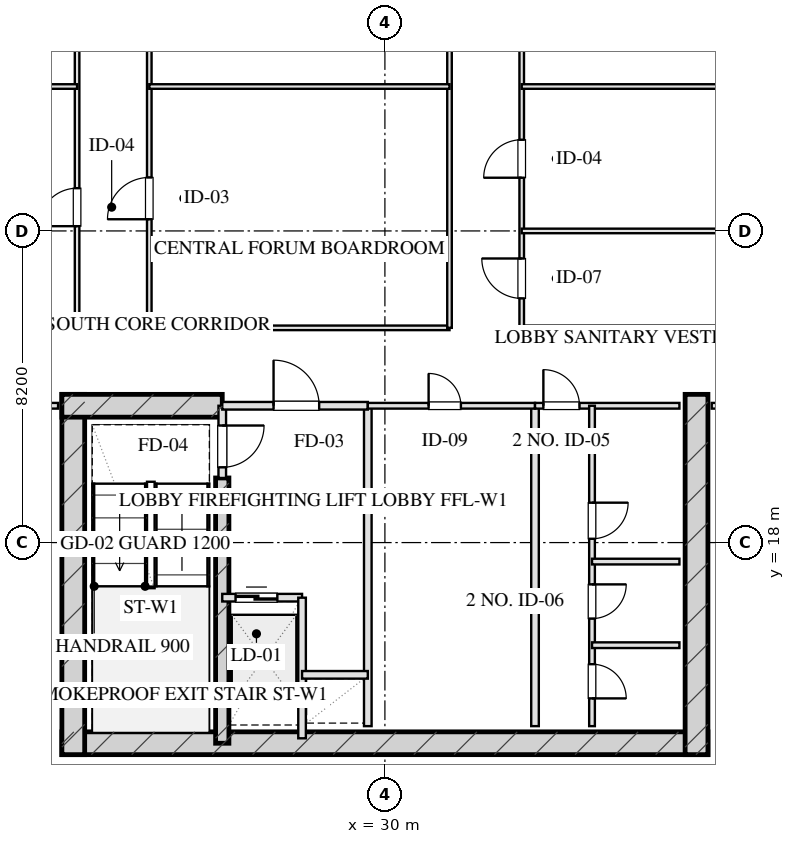
"""IFC4 building model, lengths in metres.
Left out: names, types, materials, properties, quantities, classifications, styles, units other than length and angle.
Written with IfcOpenShell. Run it as: python <this file> out.ifc"""

import sys

from ifc_helpers import new_model, si_unit, direction, frame, frame_2d, origin, place, context, subcontext, project, spatial, rectangle, extrude, element, fill, save


model = new_model("IFC4")
c1 = context("Model", 3, precision=1e-05, world=origin(), true_north=direction((0.0, 1.0)))
c2 = subcontext(c1, "Body", "Model", "MODEL_VIEW")
j1 = project(units=[si_unit("LENGTHUNIT", "METRE"), si_unit("PLANEANGLEUNIT", "RADIAN")], contexts=[c1])
p1 = place(None, origin())
s1 = spatial("IfcSite", under=j1, at=p1, CompositionType="ELEMENT")
p2 = place(p1, origin())
s2 = spatial("IfcBuilding", under=s1, at=p2, CompositionType="ELEMENT")
p3 = place(p2, frame((0.0, 0.0, 120.75)))
s3 = spatial("IfcBuildingStorey", under=s2, at=p3, CompositionType="ELEMENT", Elevation=120.75)
p4 = place(p3, frame((21.5, 12.72, 0.0), z_axis=(0.0, 0.0, 1.0), x_axis=(1.0, 0.0, 0.0)))
e1 = element("IfcWall", 1, at=p4, inside=s3, PredefinedType="SHEAR", context=c2, shape_type="SweptSolid", body=[
    extrude(rectangle(XDim=17.0, YDim=0.6, at=frame_2d((8.5, 0.0))), origin(), (0.0, 0.0, 1.0), 3.45),
])
for number, where, z_axis, x_axis in (
    (2, (21.8, 21.9, 0.0), (0.0, 0.0, 1.0), (0.0, -1.0, 0.0)),
    (3, (38.2, 21.9, 0.0), (0.0, 0.0, 1.0), (0.0, -1.0, 0.0)),
):
    element("IfcWall", number, at=place(p3, frame(where, z_axis=z_axis, x_axis=x_axis)), inside=s3, PredefinedType="SHEAR", context=c2, shape_type="SweptSolid", body=[
        extrude(rectangle(XDim=9.48, YDim=0.6, at=frame_2d((4.74, 0.0))), origin(), (0.0, 0.0, 1.0), 3.45),
    ])
p5 = place(p3, frame((25.72, 19.7, 0.0), z_axis=(0.0, 0.0, 1.0), x_axis=(0.0, -1.0, 0.0)))
e4 = element("IfcWall", 4, at=p5, inside=s3, PredefinedType="SHEAR", context=c2, shape_type="SweptSolid", body=[
    extrude(rectangle(XDim=6.98, YDim=0.35, at=frame_2d((3.49, 0.0))), origin(), (0.0, 0.0, 1.0), 3.45),
])
p6 = place(p3, frame((21.5, 21.6, 0.0), z_axis=(0.0, 0.0, 1.0), x_axis=(1.0, 0.0, 0.0)))
e5 = element("IfcWall", 5, at=p6, inside=s3, PredefinedType="SHEAR", context=c2, shape_type="SweptSolid", body=[
    extrude(rectangle(XDim=4.22, YDim=0.6, at=frame_2d((2.11, 0.0))), origin(), (0.0, 0.0, 1.0), 3.45),
])
p7 = place(p3, frame((25.72, 21.6, 0.0), z_axis=(0.0, 0.0, 1.0), x_axis=(0.0, -1.0, 0.0)))
e6 = element("IfcWall", 6, at=p7, inside=s3, PredefinedType="PARTITIONING", context=c2, shape_type="SweptSolid", body=[
    extrude(rectangle(XDim=1.9, YDim=0.2, at=frame_2d((0.95, 0.0))), origin(), (0.0, 0.0, 1.0), 3.175),
])
p8 = place(p7, frame((0.52, 0.0, 0.0)))
e7 = element("IfcOpeningElement", 7, at=p8, cuts=e6, PredefinedType="OPENING", context=c2, shape_type="SweptSolid", body=[
    extrude(rectangle(XDim=1.1, YDim=2.05, at=frame_2d((0.55, 1.025))), frame((0.0, 0.11, 0.0), z_axis=(0.0, -1.0, 0.0), x_axis=(1.0, 0.0, 0.0)), (0.0, 0.0, 1.0), 0.22),
])
p9 = place(p3, frame((29.55, 21.6, 0.0), z_axis=(0.0, 0.0, 1.0), x_axis=(0.0, -1.0, 0.0)))
e8 = element("IfcWall", 8, at=p9, inside=s3, PredefinedType="PARTITIONING", context=c2, shape_type="SweptSolid", body=[
    extrude(rectangle(XDim=8.43, YDim=0.2, at=frame_2d((4.215, 0.0))), origin(), (0.0, 0.0, 1.0), 3.175),
])
p10 = place(p3, frame((25.72, 21.6, 0.0), z_axis=(0.0, 0.0, 1.0), x_axis=(1.0, 0.0, 0.0)))
e9 = element("IfcWall", 9, at=p10, inside=s3, PredefinedType="PARTITIONING", context=c2, shape_type="SweptSolid", body=[
    extrude(rectangle(XDim=3.83, YDim=0.2, at=frame_2d((1.915, 0.0))), origin(), (0.0, 0.0, 1.0), 3.175),
])
p11 = place(p10, frame((1.35, 0.0, 0.0)))
e10 = element("IfcOpeningElement", 10, at=p11, cuts=e9, PredefinedType="OPENING", context=c2, shape_type="SweptSolid", body=[
    extrude(rectangle(XDim=1.2, YDim=2.05, at=frame_2d((0.6, 1.025))), frame((0.0, 0.11, 0.0), z_axis=(0.0, -1.0, 0.0), x_axis=(1.0, 0.0, 0.0)), (0.0, 0.0, 1.0), 0.22),
])
p12 = place(p3, frame((25.72, 16.55, 0.0), z_axis=(0.0, 0.0, 1.0), x_axis=(1.0, 0.0, 0.0)))
e11 = element("IfcWall", 11, at=p12, inside=s3, PredefinedType="PARTITIONING", context=c2, shape_type="SweptSolid", body=[
    extrude(rectangle(XDim=2.1, YDim=0.2, at=frame_2d((1.05, 0.0))), origin(), (0.0, 0.0, 1.0), 3.175),
])
p13 = place(p12, frame((0.35, 0.0, 0.0)))
e12 = element("IfcOpeningElement", 12, at=p13, cuts=e11, PredefinedType="OPENING", context=c2, shape_type="SweptSolid", body=[
    extrude(rectangle(XDim=1.1, YDim=2.05, at=frame_2d((0.55, 1.025))), frame((0.0, 0.11, 0.0), z_axis=(0.0, -1.0, 0.0), x_axis=(1.0, 0.0, 0.0)), (0.0, 0.0, 1.0), 0.22),
])
p14 = place(p3, frame((27.82, 16.55, 0.0), z_axis=(0.0, 0.0, 1.0), x_axis=(0.0, -1.0, 0.0)))
e13 = element("IfcWall", 13, at=p14, inside=s3, PredefinedType="PARTITIONING", context=c2, shape_type="SweptSolid", body=[
    extrude(rectangle(XDim=3.7, YDim=0.2, at=frame_2d((1.85, 0.0))), origin(), (0.0, 0.0, 1.0), 3.175),
])
p15 = place(p3, frame((27.82, 14.52, 0.0), z_axis=(0.0, 0.0, 1.0), x_axis=(1.0, 0.0, 0.0)))
e14 = element("IfcWall", 14, at=p15, inside=s3, PredefinedType="PARTITIONING", context=c2, shape_type="SweptSolid", body=[
    extrude(rectangle(XDim=1.73, YDim=0.2, at=frame_2d((0.865, 0.0))), origin(), (0.0, 0.0, 1.0), 3.175),
])
p16 = place(p3, frame((33.95, 21.6, 0.0), z_axis=(0.0, 0.0, 1.0), x_axis=(0.0, -1.0, 0.0)))
e15 = element("IfcWall", 15, at=p16, inside=s3, PredefinedType="PARTITIONING", context=c2, shape_type="SweptSolid", body=[
    extrude(rectangle(XDim=8.43, YDim=0.2, at=frame_2d((4.215, 0.0))), origin(), (0.0, 0.0, 1.0), 3.175),
])
p17 = place(p3, frame((29.55, 21.6, 0.0), z_axis=(0.0, 0.0, 1.0), x_axis=(1.0, 0.0, 0.0)))
e16 = element("IfcWall", 16, at=p17, inside=s3, PredefinedType="PARTITIONING", context=c2, shape_type="SweptSolid", body=[
    extrude(rectangle(XDim=4.4, YDim=0.15, at=frame_2d((2.2, 0.0))), origin(), (0.0, 0.0, 1.0), 3.175),
])
p18 = place(p17, frame((1.6, 0.0, 0.0)))
e17 = element("IfcOpeningElement", 17, at=p18, cuts=e16, PredefinedType="OPENING", context=c2, shape_type="SweptSolid", body=[
    extrude(rectangle(XDim=0.85, YDim=2.05, at=frame_2d((0.425, 1.025))), frame((0.0, 0.085, 0.0), z_axis=(0.0, -1.0, 0.0), x_axis=(1.0, 0.0, 0.0)), (0.0, 0.0, 1.0), 0.17),
])
p19 = place(p3, frame((33.95, 21.6, 0.0), z_axis=(0.0, 0.0, 1.0), x_axis=(1.0, 0.0, 0.0)))
e18 = element("IfcWall", 18, at=p19, inside=s3, PredefinedType="PARTITIONING", context=c2, shape_type="SweptSolid", body=[
    extrude(rectangle(XDim=3.8, YDim=0.15, at=frame_2d((1.9, 0.0))), origin(), (0.0, 0.0, 1.0), 3.175),
])
p20 = place(p19, frame((0.22, 0.0, 0.0)))
e19 = element("IfcOpeningElement", 19, at=p20, cuts=e18, PredefinedType="OPENING", context=c2, shape_type="SweptSolid", body=[
    extrude(rectangle(XDim=0.95, YDim=2.05, at=frame_2d((0.475, 1.025))), frame((0.0, 0.085, 0.0), z_axis=(0.0, -1.0, 0.0), x_axis=(1.0, 0.0, 0.0)), (0.0, 0.0, 1.0), 0.17),
])
p21 = place(p3, frame((35.45, 21.6, 0.0), z_axis=(0.0, 0.0, 1.0), x_axis=(0.0, -1.0, 0.0)))
e20 = element("IfcWall", 20, at=p21, inside=s3, PredefinedType="PARTITIONING", context=c2, shape_type="SweptSolid", body=[
    extrude(rectangle(XDim=8.43, YDim=0.15, at=frame_2d((4.215, 0.0))), origin(), (0.0, 0.0, 1.0), 2.815),
])
p22 = place(p21, frame((2.55, 0.0, 0.0)))
e21 = element("IfcOpeningElement", 21, at=p22, cuts=e20, PredefinedType="OPENING", context=c2, shape_type="SweptSolid", body=[
    extrude(rectangle(XDim=0.95, YDim=2.05, at=frame_2d((0.475, 1.025))), frame((0.0, 0.085, 0.0), z_axis=(0.0, -1.0, 0.0), x_axis=(1.0, 0.0, 0.0)), (0.0, 0.0, 1.0), 0.17),
])
p23 = place(p21, frame((4.7, 0.0, 0.0)))
e22 = element("IfcOpeningElement", 22, at=p23, cuts=e20, PredefinedType="OPENING", context=c2, shape_type="SweptSolid", body=[
    extrude(rectangle(XDim=0.9, YDim=2.05, at=frame_2d((0.45, 1.025))), frame((0.0, 0.085, 0.0), z_axis=(0.0, -1.0, 0.0), x_axis=(1.0, 0.0, 0.0)), (0.0, 0.0, 1.0), 0.17),
])
p24 = place(p21, frame((6.8, 0.0, 0.0)))
e23 = element("IfcOpeningElement", 23, at=p24, cuts=e20, PredefinedType="OPENING", context=c2, shape_type="SweptSolid", body=[
    extrude(rectangle(XDim=0.9, YDim=2.05, at=frame_2d((0.45, 1.025))), frame((0.0, 0.085, 0.0), z_axis=(0.0, -1.0, 0.0), x_axis=(1.0, 0.0, 0.0)), (0.0, 0.0, 1.0), 0.17),
])
for number, where, z_axis, x_axis in (
    (24, (35.45, 17.5, 0.0), (0.0, 0.0, 1.0), (1.0, 0.0, 0.0)),
    (25, (35.45, 15.3, 0.0), (0.0, 0.0, 1.0), (1.0, 0.0, 0.0)),
):
    element("IfcWall", number, at=place(p3, frame(where, z_axis=z_axis, x_axis=x_axis)), inside=s3, PredefinedType="PARTITIONING", context=c2, shape_type="SweptSolid", body=[
        extrude(rectangle(XDim=2.3, YDim=0.15, at=frame_2d((1.15, 0.0))), origin(), (0.0, 0.0, 1.0), 3.175),
    ])
p25 = place(p3, frame((11.4, 21.6, 0.0), z_axis=(0.0, 0.0, 1.0), x_axis=(1.0, 0.0, 0.0)))
e26 = element("IfcWall", 26, at=p25, inside=s3, PredefinedType="PARTITIONING", context=c2, shape_type="SweptSolid", body=[
    extrude(rectangle(XDim=10.0, YDim=0.15, at=frame_2d((5.0, 0.0))), origin(), (0.0, 0.0, 1.0), 3.175),
])
p26 = place(p25, frame((4.2, 0.0, 0.0)))
e27 = element("IfcOpeningElement", 27, at=p26, cuts=e26, PredefinedType="OPENING", context=c2, shape_type="SweptSolid", body=[
    extrude(rectangle(XDim=1.0, YDim=2.05, at=frame_2d((0.5, 1.025))), frame((0.0, 0.085, 0.0), z_axis=(0.0, -1.0, 0.0), x_axis=(1.0, 0.0, 0.0)), (0.0, 0.0, 1.0), 0.17),
])
p27 = place(p3, frame((38.6, 21.6, 0.0), z_axis=(0.0, 0.0, 1.0), x_axis=(1.0, 0.0, 0.0)))
e28 = element("IfcWall", 28, at=p27, inside=s3, PredefinedType="PARTITIONING", context=c2, shape_type="SweptSolid", body=[
    extrude(rectangle(XDim=10.0, YDim=0.15, at=frame_2d((5.0, 0.0))), origin(), (0.0, 0.0, 1.0), 3.175),
])
p28 = place(p27, frame((4.2, 0.0, 0.0)))
e29 = element("IfcOpeningElement", 29, at=p28, cuts=e28, PredefinedType="OPENING", context=c2, shape_type="SweptSolid", body=[
    extrude(rectangle(XDim=1.0, YDim=2.05, at=frame_2d((0.5, 1.025))), frame((0.0, 0.085, 0.0), z_axis=(0.0, -1.0, 0.0), x_axis=(1.0, 0.0, 0.0)), (0.0, 0.0, 1.0), 0.17),
])
p29 = place(p3, frame((11.4, 23.65, 0.0), z_axis=(0.0, 0.0, 1.0), x_axis=(1.0, 0.0, 0.0)))
e30 = element("IfcWall", 30, at=p29, inside=s3, PredefinedType="PARTITIONING", context=c2, shape_type="SweptSolid", body=[
    extrude(rectangle(XDim=10.5, YDim=0.12, at=frame_2d((5.25, 0.0))), origin(), (0.0, 0.0, 1.0), 3.175),
])
p30 = place(p3, frame((23.8, 23.65, 0.0), z_axis=(0.0, 0.0, 1.0), x_axis=(1.0, 0.0, 0.0)))
e31 = element("IfcWall", 31, at=p30, inside=s3, PredefinedType="PARTITIONING", context=c2, shape_type="SweptSolid", body=[
    extrude(rectangle(XDim=7.9, YDim=0.12, at=frame_2d((3.95, 0.0))), origin(), (0.0, 0.0, 1.0), 3.175),
])
p31 = place(p3, frame((33.6, 23.65, 0.0), z_axis=(0.0, 0.0, 1.0), x_axis=(1.0, 0.0, 0.0)))
e32 = element("IfcWall", 32, at=p31, inside=s3, PredefinedType="PARTITIONING", context=c2, shape_type="SweptSolid", body=[
    extrude(rectangle(XDim=15.0, YDim=0.12, at=frame_2d((7.5, 0.0))), origin(), (0.0, 0.0, 1.0), 3.175),
])
p32 = place(p3, frame((21.9, 23.65, 0.0), z_axis=(0.0, 0.0, 1.0), x_axis=(0.0, 1.0, 0.0)))
e33 = element("IfcWall", 33, at=p32, inside=s3, PredefinedType="PARTITIONING", context=c2, shape_type="SweptSolid", body=[
    extrude(rectangle(XDim=20.7, YDim=0.12, at=frame_2d((10.35, 0.0))), origin(), (0.0, 0.0, 1.0), 3.175),
])
p33 = place(p32, frame((2.675, 0.0, 0.0)))
e34 = element("IfcOpeningElement", 34, at=p33, cuts=e33, PredefinedType="OPENING", context=c2, shape_type="SweptSolid", body=[
    extrude(rectangle(XDim=1.0, YDim=2.05, at=frame_2d((0.5, 1.025))), frame((0.0, 0.07, 0.0), z_axis=(0.0, -1.0, 0.0), x_axis=(1.0, 0.0, 0.0)), (0.0, 0.0, 1.0), 0.14),
])
p34 = place(p32, frame((9.85, 0.0, 0.0)))
e35 = element("IfcOpeningElement", 35, at=p34, cuts=e33, PredefinedType="OPENING", context=c2, shape_type="SweptSolid", body=[
    extrude(rectangle(XDim=1.0, YDim=2.05, at=frame_2d((0.5, 1.025))), frame((0.0, 0.07, 0.0), z_axis=(0.0, -1.0, 0.0), x_axis=(1.0, 0.0, 0.0)), (0.0, 0.0, 1.0), 0.14),
])
p35 = place(p32, frame((17.025, 0.0, 0.0)))
e36 = element("IfcOpeningElement", 36, at=p35, cuts=e33, PredefinedType="OPENING", context=c2, shape_type="SweptSolid", body=[
    extrude(rectangle(XDim=1.0, YDim=2.05, at=frame_2d((0.5, 1.025))), frame((0.0, 0.07, 0.0), z_axis=(0.0, -1.0, 0.0), x_axis=(1.0, 0.0, 0.0)), (0.0, 0.0, 1.0), 0.14),
])
p36 = place(p3, frame((23.8, 23.65, 0.0), z_axis=(0.0, 0.0, 1.0), x_axis=(0.0, 1.0, 0.0)))
e37 = element("IfcWall", 37, at=p36, inside=s3, PredefinedType="PARTITIONING", context=c2, shape_type="SweptSolid", body=[
    extrude(rectangle(XDim=20.7, YDim=0.12, at=frame_2d((10.35, 0.0))), origin(), (0.0, 0.0, 1.0), 3.175),
])
p37 = place(p36, frame((2.857, 0.0, 0.0)))
e38 = element("IfcOpeningElement", 38, at=p37, cuts=e37, PredefinedType="OPENING", context=c2, shape_type="SweptSolid", body=[
    extrude(rectangle(XDim=1.1, YDim=2.05, at=frame_2d((0.55, 1.025))), frame((0.0, 0.07, 0.0), z_axis=(0.0, -1.0, 0.0), x_axis=(1.0, 0.0, 0.0)), (0.0, 0.0, 1.0), 0.14),
])
p38 = place(p36, frame((17.189, 0.0, 0.0)))
e39 = element("IfcOpeningElement", 39, at=p38, cuts=e37, PredefinedType="OPENING", context=c2, shape_type="SweptSolid", body=[
    extrude(rectangle(XDim=1.1, YDim=2.05, at=frame_2d((0.55, 1.025))), frame((0.0, 0.07, 0.0), z_axis=(0.0, -1.0, 0.0), x_axis=(1.0, 0.0, 0.0)), (0.0, 0.0, 1.0), 0.14),
])
p39 = place(p3, frame((31.7, 23.65, 0.0), z_axis=(0.0, 0.0, 1.0), x_axis=(0.0, 1.0, 0.0)))
e40 = element("IfcWall", 40, at=p39, inside=s3, PredefinedType="PARTITIONING", context=c2, shape_type="SweptSolid", body=[
    extrude(rectangle(XDim=20.7, YDim=0.12, at=frame_2d((10.35, 0.0))), origin(), (0.0, 0.0, 1.0), 3.175),
])
p40 = place(p39, frame((9.696, 0.0, 0.0)))
e41 = element("IfcOpeningElement", 41, at=p40, cuts=e40, PredefinedType="OPENING", context=c2, shape_type="SweptSolid", body=[
    extrude(rectangle(XDim=1.1, YDim=2.05, at=frame_2d((0.55, 1.025))), frame((0.0, 0.07, 0.0), z_axis=(0.0, -1.0, 0.0), x_axis=(1.0, 0.0, 0.0)), (0.0, 0.0, 1.0), 0.14),
])
p41 = place(p3, frame((33.6, 23.65, 0.0), z_axis=(0.0, 0.0, 1.0), x_axis=(0.0, 1.0, 0.0)))
e42 = element("IfcWall", 42, at=p41, inside=s3, PredefinedType="PARTITIONING", context=c2, shape_type="SweptSolid", body=[
    extrude(rectangle(XDim=20.7, YDim=0.12, at=frame_2d((10.35, 0.0))), origin(), (0.0, 0.0, 1.0), 3.175),
])
p42 = place(p41, frame((0.775, 0.0, 0.0)))
e43 = element("IfcOpeningElement", 43, at=p42, cuts=e42, PredefinedType="OPENING", context=c2, shape_type="SweptSolid", body=[
    extrude(rectangle(XDim=1.05, YDim=2.05, at=frame_2d((0.525, 1.025))), frame((0.0, 0.07, 0.0), z_axis=(0.0, -1.0, 0.0), x_axis=(1.0, 0.0, 0.0)), (0.0, 0.0, 1.0), 0.14),
])
p43 = place(p41, frame((3.95, 0.0, 0.0)))
e44 = element("IfcOpeningElement", 44, at=p43, cuts=e42, PredefinedType="OPENING", context=c2, shape_type="SweptSolid", body=[
    extrude(rectangle(XDim=1.0, YDim=2.05, at=frame_2d((0.5, 1.025))), frame((0.0, 0.07, 0.0), z_axis=(0.0, -1.0, 0.0), x_axis=(1.0, 0.0, 0.0)), (0.0, 0.0, 1.0), 0.14),
])
p44 = place(p41, frame((8.19, 0.0, 0.0)))
e45 = element("IfcOpeningElement", 45, at=p44, cuts=e42, PredefinedType="OPENING", context=c2, shape_type="SweptSolid", body=[
    extrude(rectangle(XDim=1.0, YDim=2.05, at=frame_2d((0.5, 1.025))), frame((0.0, 0.07, 0.0), z_axis=(0.0, -1.0, 0.0), x_axis=(1.0, 0.0, 0.0)), (0.0, 0.0, 1.0), 0.14),
])
p45 = place(p41, frame((12.257, 0.0, 0.0)))
e46 = element("IfcOpeningElement", 46, at=p45, cuts=e42, PredefinedType="OPENING", context=c2, shape_type="SweptSolid", body=[
    extrude(rectangle(XDim=0.85, YDim=2.05, at=frame_2d((0.425, 1.025))), frame((0.0, 0.07, 0.0), z_axis=(0.0, -1.0, 0.0), x_axis=(1.0, 0.0, 0.0)), (0.0, 0.0, 1.0), 0.14),
])
p46 = place(p41, frame((15.816, 0.0, 0.0)))
e47 = element("IfcOpeningElement", 47, at=p46, cuts=e42, PredefinedType="OPENING", context=c2, shape_type="SweptSolid", body=[
    extrude(rectangle(XDim=1.0, YDim=2.05, at=frame_2d((0.5, 1.025))), frame((0.0, 0.07, 0.0), z_axis=(0.0, -1.0, 0.0), x_axis=(1.0, 0.0, 0.0)), (0.0, 0.0, 1.0), 0.14),
])
p47 = place(p41, frame((18.925, 0.0, 0.0)))
e48 = element("IfcOpeningElement", 48, at=p47, cuts=e42, PredefinedType="OPENING", context=c2, shape_type="SweptSolid", body=[
    extrude(rectangle(XDim=1.0, YDim=2.05, at=frame_2d((0.5, 1.025))), frame((0.0, 0.07, 0.0), z_axis=(0.0, -1.0, 0.0), x_axis=(1.0, 0.0, 0.0)), (0.0, 0.0, 1.0), 0.14),
])
p48 = place(p3, frame((23.8, 30.0, 0.0), z_axis=(0.0, 0.0, 1.0), x_axis=(1.0, 0.0, 0.0)))
e49 = element("IfcWall", 49, at=p48, inside=s3, PredefinedType="PARTITIONING", context=c2, shape_type="SweptSolid", body=[
    extrude(rectangle(XDim=7.9, YDim=0.12, at=frame_2d((3.95, 0.0))), origin(), (0.0, 0.0, 1.0), 3.175),
])
p49 = place(p3, frame((11.4, 30.0, 0.0), z_axis=(0.0, 0.0, 1.0), x_axis=(1.0, 0.0, 0.0)))
e50 = element("IfcWall", 50, at=p49, inside=s3, PredefinedType="PARTITIONING", context=c2, shape_type="SweptSolid", body=[
    extrude(rectangle(XDim=10.5, YDim=0.12, at=frame_2d((5.25, 0.0))), origin(), (0.0, 0.0, 1.0), 3.175),
])
for number, where, z_axis, x_axis in (
    (51, (33.6, 26.2, 0.0), (0.0, 0.0, 1.0), (1.0, 0.0, 0.0)),
    (52, (33.6, 30.0, 0.0), (0.0, 0.0, 1.0), (1.0, 0.0, 0.0)),
):
    element("IfcWall", number, at=place(p3, frame(where, z_axis=z_axis, x_axis=x_axis)), inside=s3, PredefinedType="PARTITIONING", context=c2, shape_type="SweptSolid", body=[
        extrude(rectangle(XDim=15.0, YDim=0.12, at=frame_2d((7.5, 0.0))), origin(), (0.0, 0.0, 1.0), 3.175),
    ])
p50 = place(p8, origin())
e53 = element("IfcDoor", 53, at=p50, inside=s3, OperationType="SINGLE_SWING_LEFT", PredefinedType="DOOR", context=c2, shape_type="SweptSolid", body=[
    extrude(rectangle(XDim=1.1, YDim=2.05, at=frame_2d((0.55, 1.025))), frame((0.0, 0.025, 0.0), z_axis=(0.0, -1.0, 0.0), x_axis=(1.0, 0.0, 0.0)), (0.0, 0.0, 1.0), 0.05),
])
fill(e7, e53)
p51 = place(p11, origin())
e54 = element("IfcDoor", 54, at=p51, inside=s3, OperationType="SINGLE_SWING_LEFT", PredefinedType="DOOR", context=c2, shape_type="SweptSolid", body=[
    extrude(rectangle(XDim=1.2, YDim=2.05, at=frame_2d((0.6, 1.025))), frame((0.0, 0.025, 0.0), z_axis=(0.0, -1.0, 0.0), x_axis=(1.0, 0.0, 0.0)), (0.0, 0.0, 1.0), 0.05),
])
fill(e10, e54)
p52 = place(p13, origin())
e55 = element("IfcDoor", 55, at=p52, inside=s3, OperationType="DOUBLE_DOOR_SLIDING", PredefinedType="DOOR", context=c2, shape_type="SweptSolid", body=[
    extrude(rectangle(XDim=1.1, YDim=2.05, at=frame_2d((0.55, 1.025))), frame((0.0, 0.025, 0.0), z_axis=(0.0, -1.0, 0.0), x_axis=(1.0, 0.0, 0.0)), (0.0, 0.0, 1.0), 0.05),
])
fill(e12, e55)
p53 = place(p18, origin())
e56 = element("IfcDoor", 56, at=p53, inside=s3, OperationType="SINGLE_SWING_LEFT", PredefinedType="DOOR", context=c2, shape_type="SweptSolid", body=[
    extrude(rectangle(XDim=0.85, YDim=2.05, at=frame_2d((0.425, 1.025))), frame((0.0, 0.025, 0.0), z_axis=(0.0, -1.0, 0.0), x_axis=(1.0, 0.0, 0.0)), (0.0, 0.0, 1.0), 0.05),
])
fill(e17, e56)
p54 = place(p20, origin())
e57 = element("IfcDoor", 57, at=p54, inside=s3, OperationType="SINGLE_SWING_LEFT", PredefinedType="DOOR", context=c2, shape_type="SweptSolid", body=[
    extrude(rectangle(XDim=0.95, YDim=2.05, at=frame_2d((0.475, 1.025))), frame((0.0, 0.025, 0.0), z_axis=(0.0, -1.0, 0.0), x_axis=(1.0, 0.0, 0.0)), (0.0, 0.0, 1.0), 0.05),
])
fill(e19, e57)
p55 = place(p22, origin())
e58 = element("IfcDoor", 58, at=p55, inside=s3, OperationType="SINGLE_SWING_LEFT", PredefinedType="DOOR", context=c2, shape_type="SweptSolid", body=[
    extrude(rectangle(XDim=0.95, YDim=2.05, at=frame_2d((0.475, 1.025))), frame((0.0, 0.025, 0.0), z_axis=(0.0, -1.0, 0.0), x_axis=(1.0, 0.0, 0.0)), (0.0, 0.0, 1.0), 0.05),
])
fill(e21, e58)
p56 = place(p23, origin())
e59 = element("IfcDoor", 59, at=p56, inside=s3, OperationType="SINGLE_SWING_LEFT", PredefinedType="DOOR", context=c2, shape_type="SweptSolid", body=[
    extrude(rectangle(XDim=0.9, YDim=2.05, at=frame_2d((0.45, 1.025))), frame((0.0, 0.025, 0.0), z_axis=(0.0, -1.0, 0.0), x_axis=(1.0, 0.0, 0.0)), (0.0, 0.0, 1.0), 0.05),
])
fill(e22, e59)
p57 = place(p24, origin())
e60 = element("IfcDoor", 60, at=p57, inside=s3, OperationType="SINGLE_SWING_RIGHT", PredefinedType="DOOR", context=c2, shape_type="SweptSolid", body=[
    extrude(rectangle(XDim=0.9, YDim=2.05, at=frame_2d((0.45, 1.025))), frame((0.0, 0.025, 0.0), z_axis=(0.0, -1.0, 0.0), x_axis=(1.0, 0.0, 0.0)), (0.0, 0.0, 1.0), 0.05),
])
fill(e23, e60)
p58 = place(p33, origin())
e61 = element("IfcDoor", 61, at=p58, inside=s3, OperationType="SINGLE_SWING_LEFT", PredefinedType="DOOR", context=c2, shape_type="SweptSolid", body=[
    extrude(rectangle(XDim=1.0, YDim=2.05, at=frame_2d((0.5, 1.025))), frame((0.0, 0.025, 0.0), z_axis=(0.0, -1.0, 0.0), x_axis=(1.0, 0.0, 0.0)), (0.0, 0.0, 1.0), 0.05),
])
fill(e34, e61)
p59 = place(p37, origin())
e62 = element("IfcDoor", 62, at=p59, inside=s3, OperationType="SINGLE_SWING_LEFT", PredefinedType="DOOR", context=c2, shape_type="SweptSolid", body=[
    extrude(rectangle(XDim=1.1, YDim=2.05, at=frame_2d((0.55, 1.025))), frame((0.0, 0.025, 0.0), z_axis=(0.0, -1.0, 0.0), x_axis=(1.0, 0.0, 0.0)), (0.0, 0.0, 1.0), 0.05),
])
fill(e38, e62)
p60 = place(p42, origin())
e63 = element("IfcDoor", 63, at=p60, inside=s3, OperationType="SINGLE_SWING_RIGHT", PredefinedType="DOOR", context=c2, shape_type="SweptSolid", body=[
    extrude(rectangle(XDim=1.05, YDim=2.05, at=frame_2d((0.525, 1.025))), frame((0.0, 0.025, 0.0), z_axis=(0.0, -1.0, 0.0), x_axis=(1.0, 0.0, 0.0)), (0.0, 0.0, 1.0), 0.05),
])
fill(e43, e63)
p61 = place(p43, origin())
e64 = element("IfcDoor", 64, at=p61, inside=s3, OperationType="SINGLE_SWING_LEFT", PredefinedType="DOOR", context=c2, shape_type="SweptSolid", body=[
    extrude(rectangle(XDim=1.0, YDim=2.05, at=frame_2d((0.5, 1.025))), frame((0.0, 0.025, 0.0), z_axis=(0.0, -1.0, 0.0), x_axis=(1.0, 0.0, 0.0)), (0.0, 0.0, 1.0), 0.05),
])
fill(e44, e64)
save(model, sys.argv[1])
